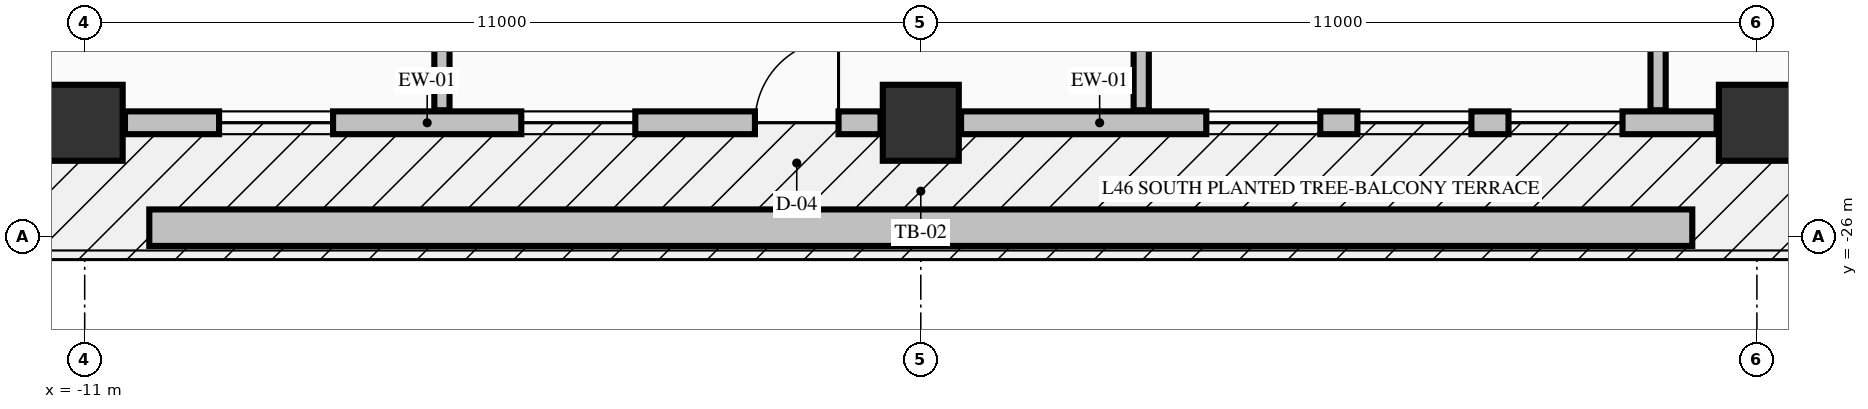
"""IFC4 building model, lengths in metres.
Left out: names, types, materials, properties, quantities, classifications, styles, units other than length and angle.
Written with IfcOpenShell. Run it as: python <this file> out.ifc"""

import sys

from ifc_helpers import new_model, si_unit, direction, frame, frame_2d, origin, origin_2d, place, context, subcontext, project, spatial, rectangle, extrude, element, fill, save


model = new_model("IFC4")
c1 = context("Model", 3, precision=1e-05, world=origin(), true_north=direction((0.0, 1.0)))
c2 = subcontext(c1, "Body", "Model", "MODEL_VIEW")
j1 = project(units=[si_unit("LENGTHUNIT", "METRE"), si_unit("PLANEANGLEUNIT", "RADIAN")], contexts=[c1])
p1 = place(None, origin())
s1 = spatial("IfcSite", under=j1, at=p1, CompositionType="ELEMENT")
p2 = place(p1, origin())
s2 = spatial("IfcBuilding", under=s1, at=p2, CompositionType="ELEMENT")
p3 = place(p2, frame((0.0, 0.0, 179.66)))
s3 = spatial("IfcBuildingStorey", under=s2, at=p3, CompositionType="ELEMENT", Elevation=179.66)
for number, where, z_axis, x_axis in (
    (1, (-11.0, -24.5, -0.25), (0.0, 0.0, 1.0), (1.0, 0.0, 0.0)),
    (2, (0.0, -24.5, -0.25), (0.0, 0.0, 1.0), (1.0, 0.0, 0.0)),
    (3, (11.0, -24.5, -0.25), (0.0, 0.0, 1.0), (1.0, 0.0, 0.0)),
):
    element("IfcColumn", number, at=place(p3, frame(where, z_axis=z_axis, x_axis=x_axis)), inside=s3, PredefinedType="COLUMN", context=c2, shape_type="SweptSolid", body=[
        extrude(rectangle(XDim=1.0, YDim=1.0, at=origin_2d()), origin(), (0.0, 0.0, 1.0), 3.4),
    ])
p4 = place(p3, frame((-10.47, -24.5, 0.0), z_axis=(0.0, 0.0, 1.0), x_axis=(1.0, 0.0, 0.0)))
e4 = element("IfcWall", 4, at=p4, inside=s3, PredefinedType="STANDARD", context=c2, shape_type="SweptSolid", body=[
    extrude(rectangle(XDim=9.94, YDim=0.3, at=frame_2d((4.97, 0.0))), origin(), (0.0, 0.0, 1.0), 2.542),
])
p5 = place(p4, frame((8.288, 0.0, 0.0)))
e5 = element("IfcOpeningElement", 5, at=p5, cuts=e4, PredefinedType="OPENING", context=c2, shape_type="SweptSolid", body=[
    extrude(rectangle(XDim=1.1, YDim=2.15, at=frame_2d((0.55, 1.075))), frame((0.0, 0.16, 0.0), z_axis=(0.0, -1.0, 0.0), x_axis=(1.0, 0.0, 0.0)), (0.0, 0.0, 1.0), 0.32),
])
p6 = place(p4, frame((1.238, 0.0, 0.72)))
e6 = element("IfcOpeningElement", 6, at=p6, cuts=e4, PredefinedType="OPENING", context=c2, shape_type="SweptSolid", body=[
    extrude(rectangle(XDim=1.5, YDim=1.6, at=frame_2d((0.75, 0.8))), frame((0.0, 0.16, 0.0), z_axis=(0.0, -1.0, 0.0), x_axis=(1.0, 0.0, 0.0)), (0.0, 0.0, 1.0), 0.32),
])
p7 = place(p4, frame((5.214, 0.0, 0.72)))
e7 = element("IfcOpeningElement", 7, at=p7, cuts=e4, PredefinedType="OPENING", context=c2, shape_type="SweptSolid", body=[
    extrude(rectangle(XDim=1.5, YDim=1.6, at=frame_2d((0.75, 0.8))), frame((0.0, 0.16, 0.0), z_axis=(0.0, -1.0, 0.0), x_axis=(1.0, 0.0, 0.0)), (0.0, 0.0, 1.0), 0.32),
])
p8 = place(p3, frame((0.53, -24.5, 0.0), z_axis=(0.0, 0.0, 1.0), x_axis=(1.0, 0.0, 0.0)))
e8 = element("IfcWall", 8, at=p8, inside=s3, PredefinedType="STANDARD", context=c2, shape_type="SweptSolid", body=[
    extrude(rectangle(XDim=9.94, YDim=0.3, at=frame_2d((4.97, 0.0))), origin(), (0.0, 0.0, 1.0), 2.542),
])
p9 = place(p8, frame((3.226, 0.0, 0.72)))
e9 = element("IfcOpeningElement", 9, at=p9, cuts=e8, PredefinedType="OPENING", context=c2, shape_type="SweptSolid", body=[
    extrude(rectangle(XDim=1.5, YDim=1.6, at=frame_2d((0.75, 0.8))), frame((0.0, 0.16, 0.0), z_axis=(0.0, -1.0, 0.0), x_axis=(1.0, 0.0, 0.0)), (0.0, 0.0, 1.0), 0.32),
])
p10 = place(p8, frame((5.214, 0.0, 0.72)))
e10 = element("IfcOpeningElement", 10, at=p10, cuts=e8, PredefinedType="OPENING", context=c2, shape_type="SweptSolid", body=[
    extrude(rectangle(XDim=1.5, YDim=1.6, at=frame_2d((0.75, 0.8))), frame((0.0, 0.16, 0.0), z_axis=(0.0, -1.0, 0.0), x_axis=(1.0, 0.0, 0.0)), (0.0, 0.0, 1.0), 0.32),
])
p11 = place(p8, frame((7.202, 0.0, 0.72)))
e11 = element("IfcOpeningElement", 11, at=p11, cuts=e8, PredefinedType="OPENING", context=c2, shape_type="SweptSolid", body=[
    extrude(rectangle(XDim=1.5, YDim=1.6, at=frame_2d((0.75, 0.8))), frame((0.0, 0.16, 0.0), z_axis=(0.0, -1.0, 0.0), x_axis=(1.0, 0.0, 0.0)), (0.0, 0.0, 1.0), 0.32),
])
p12 = place(p3, frame((-6.3, -24.335, 0.0), z_axis=(0.0, 0.0, 1.0), x_axis=(0.0, 1.0, 0.0)))
e12 = element("IfcWall", 12, at=p12, inside=s3, PredefinedType="PARTITIONING", context=c2, shape_type="SweptSolid", body=[
    extrude(rectangle(XDim=9.807, YDim=0.2, at=frame_2d((4.903, 0.0))), origin(), (0.0, 0.0, 1.0), 3.15),
])
p13 = place(p3, frame((2.9, -24.335, 0.0), z_axis=(0.0, 0.0, 1.0), x_axis=(0.0, 1.0, 0.0)))
e13 = element("IfcWall", 13, at=p13, inside=s3, PredefinedType="PARTITIONING", context=c2, shape_type="SweptSolid", body=[
    extrude(rectangle(XDim=9.107, YDim=0.2, at=frame_2d((4.553, 0.0))), origin(), (0.0, 0.0, 1.0), 3.15),
])
p14 = place(p3, frame((9.7, -24.335, 0.0), z_axis=(0.0, 0.0, 1.0), x_axis=(0.0, 1.0, 0.0)))
e14 = element("IfcWall", 14, at=p14, inside=s3, PredefinedType="PARTITIONING", context=c2, shape_type="SweptSolid", body=[
    extrude(rectangle(XDim=9.807, YDim=0.2, at=frame_2d((4.903, 0.0))), origin(), (0.0, 0.0, 1.0), 3.15),
])
p15 = place(p3, frame((-10.15, -25.88, -0.04), z_axis=(0.0, 0.0, 1.0), x_axis=(1.0, 0.0, 0.0)))
e15 = element("IfcWall", 15, at=p15, inside=s3, PredefinedType="PARAPET", context=c2, shape_type="SweptSolid", body=[
    extrude(rectangle(XDim=20.3, YDim=0.48, at=frame_2d((10.15, 0.0))), origin(), (0.0, 0.0, 1.0), 0.52),
])
p16 = place(p5, origin())
e16 = element("IfcDoor", 16, at=p16, inside=s3, OperationType="SINGLE_SWING_RIGHT", PredefinedType="DOOR", context=c2, shape_type="SweptSolid", body=[
    extrude(rectangle(XDim=1.1, YDim=2.15, at=frame_2d((0.55, 1.075))), frame((0.0, 0.025, 0.0), z_axis=(0.0, -1.0, 0.0), x_axis=(1.0, 0.0, 0.0)), (0.0, 0.0, 1.0), 0.05),
])
fill(e5, e16)
p17 = place(p6, origin())
e17 = element("IfcWindow", 17, at=p17, inside=s3, PartitioningType="SINGLE_PANEL", PredefinedType="WINDOW", context=c2, shape_type="SweptSolid", body=[
    extrude(rectangle(XDim=1.5, YDim=1.6, at=frame_2d((0.75, 0.8))), frame((0.0, 0.03, 0.0), z_axis=(0.0, -1.0, 0.0), x_axis=(1.0, 0.0, 0.0)), (0.0, 0.0, 1.0), 0.06),
])
fill(e6, e17)
p18 = place(p7, origin())
e18 = element("IfcWindow", 18, at=p18, inside=s3, PartitioningType="SINGLE_PANEL", PredefinedType="WINDOW", context=c2, shape_type="SweptSolid", body=[
    extrude(rectangle(XDim=1.5, YDim=1.6, at=frame_2d((0.75, 0.8))), frame((0.0, 0.03, 0.0), z_axis=(0.0, -1.0, 0.0), x_axis=(1.0, 0.0, 0.0)), (0.0, 0.0, 1.0), 0.06),
])
fill(e7, e18)
p19 = place(p9, origin())
e19 = element("IfcWindow", 19, at=p19, inside=s3, PartitioningType="SINGLE_PANEL", PredefinedType="WINDOW", context=c2, shape_type="SweptSolid", body=[
    extrude(rectangle(XDim=1.5, YDim=1.6, at=frame_2d((0.75, 0.8))), frame((0.0, 0.03, 0.0), z_axis=(0.0, -1.0, 0.0), x_axis=(1.0, 0.0, 0.0)), (0.0, 0.0, 1.0), 0.06),
])
fill(e9, e19)
p20 = place(p10, origin())
e20 = element("IfcWindow", 20, at=p20, inside=s3, PartitioningType="SINGLE_PANEL", PredefinedType="WINDOW", context=c2, shape_type="SweptSolid", body=[
    extrude(rectangle(XDim=1.5, YDim=1.6, at=frame_2d((0.75, 0.8))), frame((0.0, 0.03, 0.0), z_axis=(0.0, -1.0, 0.0), x_axis=(1.0, 0.0, 0.0)), (0.0, 0.0, 1.0), 0.06),
])
fill(e10, e20)
p21 = place(p11, origin())
e21 = element("IfcWindow", 21, at=p21, inside=s3, PartitioningType="SINGLE_PANEL", PredefinedType="WINDOW", context=c2, shape_type="SweptSolid", body=[
    extrude(rectangle(XDim=1.5, YDim=1.6, at=frame_2d((0.75, 0.8))), frame((0.0, 0.03, 0.0), z_axis=(0.0, -1.0, 0.0), x_axis=(1.0, 0.0, 0.0)), (0.0, 0.0, 1.0), 0.06),
])
fill(e11, e21)
save(model, sys.argv[1])
